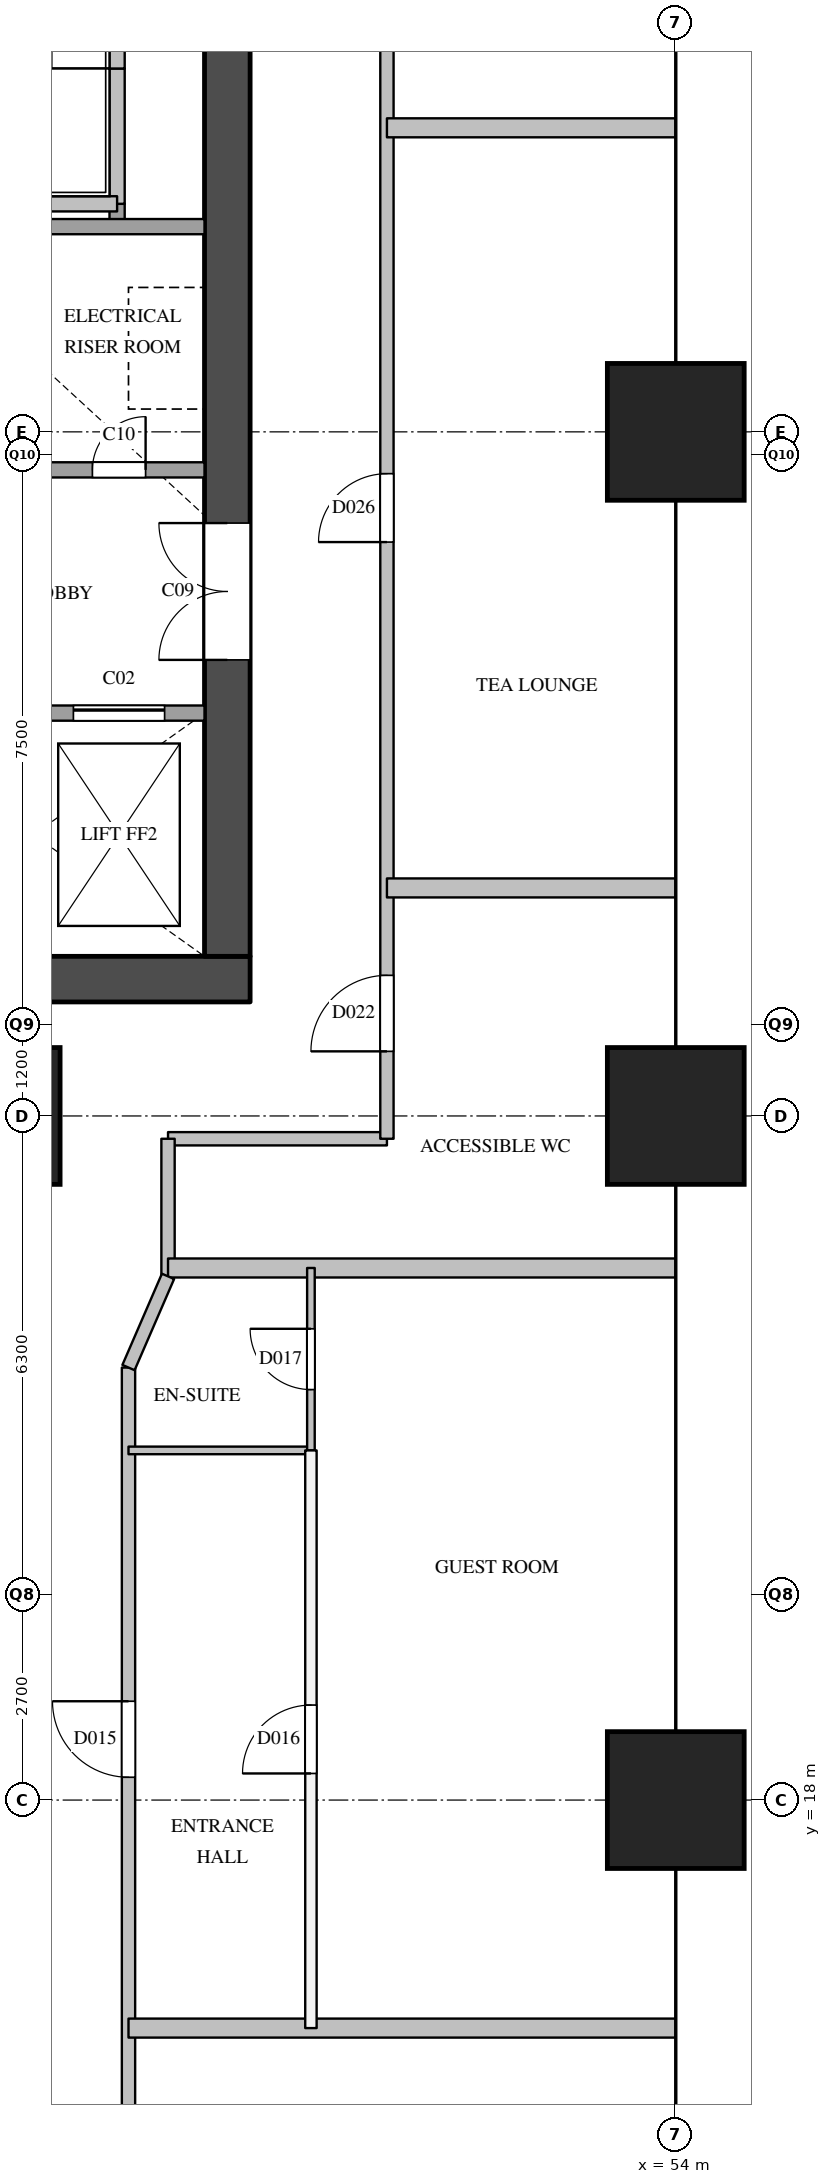
"""IFC4 building model, lengths in metres.
Left out: names, types, materials, properties, quantities, classifications, styles, units other than length and angle.
Written with IfcOpenShell. Run it as: python <this file> out.ifc"""

import sys

from ifc_helpers import new_model, si_unit, direction, frame, frame_2d, origin, origin_2d, place, context, subcontext, project, spatial, rectangle, extrude, element, fill, save


model = new_model("IFC4")
c1 = context("Model", 3, precision=1e-05, world=origin(), true_north=direction((0.0, 1.0)))
c2 = subcontext(c1, "Body", "Model", "MODEL_VIEW")
j1 = project(units=[si_unit("LENGTHUNIT", "METRE"), si_unit("PLANEANGLEUNIT", "RADIAN")], contexts=[c1])
p1 = place(None, origin())
s1 = spatial("IfcSite", under=j1, at=p1, CompositionType="ELEMENT")
p2 = place(p1, origin())
s2 = spatial("IfcBuilding", under=s1, at=p2, CompositionType="ELEMENT")
p3 = place(p2, frame((0.0, 0.0, 42.4)))
s3 = spatial("IfcBuildingStorey", under=s2, at=p3, CompositionType="ELEMENT", Elevation=42.4)
for number, where, z_axis, x_axis in (
    (1, (45.0, 27.0, 0.0), (0.0, 0.0, 1.0), (1.0, 0.0, 0.0)),
    (2, (54.0, 18.0, 0.0), (0.0, 0.0, 1.0), (1.0, 0.0, 0.0)),
    (3, (54.0, 27.0, 0.0), (0.0, 0.0, 1.0), (1.0, 0.0, 0.0)),
    (4, (54.0, 36.0, 0.0), (0.0, 0.0, 1.0), (1.0, 0.0, 0.0)),
):
    element("IfcColumn", number, at=place(p3, frame(where, z_axis=z_axis, x_axis=x_axis)), inside=s3, PredefinedType="COLUMN", context=c2, shape_type="SweptSolid", body=[
        extrude(rectangle(XDim=1.8, YDim=1.8, at=origin_2d()), origin(), (0.0, 0.0, 1.0), 3.8),
    ])
p4 = place(p3, frame((36.0, 28.8, 0.0), z_axis=(0.0, 0.0, 1.0), x_axis=(1.0, 0.0, 0.0)))
e5 = element("IfcWall", 5, at=p4, inside=s3, PredefinedType="SHEAR", context=c2, shape_type="SweptSolid", body=[
    extrude(rectangle(XDim=12.4, YDim=0.6, at=frame_2d((6.2, 0.0))), origin(), (0.0, 0.0, 1.0), 3.5),
])
p5 = place(p3, frame((48.1, 29.1, 0.0), z_axis=(0.0, 0.0, 1.0), x_axis=(0.0, 1.0, 0.0)))
e6 = element("IfcWall", 6, at=p5, inside=s3, PredefinedType="SHEAR", context=c2, shape_type="SweptSolid", body=[
    extrude(rectangle(XDim=20.3, YDim=0.6, at=frame_2d((10.15, 0.0))), origin(), (0.0, 0.0, 1.0), 3.5),
])
p6 = place(p5, frame((12.5, 0.0, 0.0)))
e7 = element("IfcOpeningElement", 7, at=p6, cuts=e6, PredefinedType="OPENING", context=c2, shape_type="SweptSolid", body=[
    extrude(rectangle(XDim=0.7, YDim=2.1, at=frame_2d((0.35, 1.05))), frame((0.0, 0.31, 0.0), z_axis=(0.0, -1.0, 0.0), x_axis=(1.0, 0.0, 0.0)), (0.0, 0.0, 1.0), 0.62),
])
p7 = place(p5, frame((3.9, 0.0, 0.0)))
e8 = element("IfcOpeningElement", 8, at=p7, cuts=e6, PredefinedType="OPENING", context=c2, shape_type="SweptSolid", body=[
    extrude(rectangle(XDim=1.8, YDim=2.1, at=frame_2d((0.9, 1.05))), frame((0.0, 0.31, 0.0), z_axis=(0.0, -1.0, 0.0), x_axis=(1.0, 0.0, 0.0)), (0.0, 0.0, 1.0), 0.62),
])
p8 = place(p3, frame((46.65, 38.7, 0.0), z_axis=(0.0, 0.0, 1.0), x_axis=(0.0, 1.0, 0.0)))
e9 = element("IfcWall", 9, at=p8, inside=s3, PredefinedType="SOLIDWALL", context=c2, shape_type="SweptSolid", body=[
    extrude(rectangle(XDim=0.3, YDim=0.2, at=frame_2d((0.15, 0.0))), origin(), (0.0, 0.0, 1.0), 3.5),
])
p9 = place(p3, frame((46.65, 39.0, 0.0), z_axis=(0.0, 0.0, 1.0), x_axis=(0.0, 1.0, 0.0)))
e10 = element("IfcWall", 10, at=p9, inside=s3, PredefinedType="SOLIDWALL", context=c2, shape_type="SweptSolid", body=[
    extrude(rectangle(XDim=1.78, YDim=0.2, at=frame_2d((0.89, 0.0))), origin(), (0.0, 0.0, 1.0), 3.5),
])
p10 = place(p3, frame((46.65, 40.78, 0.0), z_axis=(0.0, 0.0, 1.0), x_axis=(0.0, 1.0, 0.0)))
e11 = element("IfcWall", 11, at=p10, inside=s3, PredefinedType="SOLIDWALL", context=c2, shape_type="SweptSolid", body=[
    extrude(rectangle(XDim=4.42, YDim=0.2, at=frame_2d((2.21, 0.0))), origin(), (0.0, 0.0, 1.0), 3.5),
])
p11 = place(p3, frame((36.6, 32.3, 0.0), z_axis=(0.0, 0.0, 1.0), x_axis=(1.0, 0.0, 0.0)))
e12 = element("IfcWall", 12, at=p11, inside=s3, PredefinedType="SOLIDWALL", context=c2, shape_type="SweptSolid", body=[
    extrude(rectangle(XDim=11.2, YDim=0.2, at=frame_2d((5.6, 0.0))), origin(), (0.0, 0.0, 1.0), 3.5),
])
p12 = place(p11, frame((7.225, 0.0, 0.0)))
e13 = element("IfcOpeningElement", 13, at=p12, cuts=e12, PredefinedType="OPENING", context=c2, shape_type="SweptSolid", body=[
    extrude(rectangle(XDim=1.2, YDim=2.1, at=frame_2d((0.6, 1.05))), frame((0.0, 0.11, 0.0), z_axis=(0.0, -1.0, 0.0), x_axis=(1.0, 0.0, 0.0)), (0.0, 0.0, 1.0), 0.22),
])
p13 = place(p11, frame((9.475, 0.0, 0.0)))
e14 = element("IfcOpeningElement", 14, at=p13, cuts=e12, PredefinedType="OPENING", context=c2, shape_type="SweptSolid", body=[
    extrude(rectangle(XDim=1.2, YDim=2.1, at=frame_2d((0.6, 1.05))), frame((0.0, 0.11, 0.0), z_axis=(0.0, -1.0, 0.0), x_axis=(1.0, 0.0, 0.0)), (0.0, 0.0, 1.0), 0.22),
])
p14 = place(p3, frame((43.3, 35.5, 0.0), z_axis=(0.0, 0.0, 1.0), x_axis=(1.0, 0.0, 0.0)))
e15 = element("IfcWall", 15, at=p14, inside=s3, PredefinedType="SOLIDWALL", context=c2, shape_type="SweptSolid", body=[
    extrude(rectangle(XDim=4.5, YDim=0.2, at=frame_2d((2.25, 0.0))), origin(), (0.0, 0.0, 1.0), 3.5),
])
p15 = place(p14, frame((0.525, 0.0, 0.0)))
e16 = element("IfcOpeningElement", 16, at=p15, cuts=e15, PredefinedType="OPENING", context=c2, shape_type="SweptSolid", body=[
    extrude(rectangle(XDim=1.2, YDim=2.1, at=frame_2d((0.6, 1.05))), frame((0.0, 0.11, 0.0), z_axis=(0.0, -1.0, 0.0), x_axis=(1.0, 0.0, 0.0)), (0.0, 0.0, 1.0), 0.22),
])
p16 = place(p14, frame((3.025, 0.0, 0.0)))
e17 = element("IfcOpeningElement", 17, at=p16, cuts=e15, PredefinedType="OPENING", context=c2, shape_type="SweptSolid", body=[
    extrude(rectangle(XDim=0.7, YDim=2.1, at=frame_2d((0.35, 1.05))), frame((0.0, 0.11, 0.0), z_axis=(0.0, -1.0, 0.0), x_axis=(1.0, 0.0, 0.0)), (0.0, 0.0, 1.0), 0.22),
])
p17 = place(p3, frame((43.3, 38.7, 0.0), z_axis=(0.0, 0.0, 1.0), x_axis=(1.0, 0.0, 0.0)))
e18 = element("IfcWall", 18, at=p17, inside=s3, PredefinedType="SOLIDWALL", context=c2, shape_type="SweptSolid", body=[
    extrude(rectangle(XDim=4.5, YDim=0.2, at=frame_2d((2.25, 0.0))), origin(), (0.0, 0.0, 1.0), 3.5),
])
p18 = place(p3, frame((43.4, 39.0, 0.0), z_axis=(0.0, 0.0, 1.0), x_axis=(1.0, 0.0, 0.0)))
e19 = element("IfcWall", 19, at=p18, inside=s3, PredefinedType="SOLIDWALL", context=c2, shape_type="SweptSolid", body=[
    extrude(rectangle(XDim=3.25, YDim=0.2, at=frame_2d((1.625, 0.0))), origin(), (0.0, 0.0, 1.0), 3.5),
])
p19 = place(p3, frame((47.32, 26.7, 0.0), z_axis=(0.0, 0.0, 1.0), x_axis=(1.0, 0.0, 0.0)))
e20 = element("IfcWall", 20, at=p19, inside=s3, PredefinedType="PARTITIONING", context=c2, shape_type="SweptSolid", body=[
    extrude(rectangle(XDim=2.88, YDim=0.175, at=frame_2d((1.44, 0.0))), origin(), (0.0, 0.0, 1.0), 2.5),
])
p20 = place(p3, frame((46.8, 7.2, 0.0), z_axis=(0.0, 0.0, 1.0), x_axis=(0.0, 1.0, 0.0)))
e21 = element("IfcWall", 21, at=p20, inside=s3, PredefinedType="PARTITIONING", context=c2, shape_type="SweptSolid", body=[
    extrude(rectangle(XDim=16.49, YDim=0.175, at=frame_2d((8.245, 0.0))), origin(), (0.0, 0.0, 1.0), 3.5),
])
p21 = place(p20, frame((3.45, 0.0, 0.0)))
e22 = element("IfcOpeningElement", 22, at=p21, cuts=e21, PredefinedType="OPENING", context=c2, shape_type="SweptSolid", body=[
    extrude(rectangle(XDim=0.9, YDim=2.1, at=frame_2d((0.45, 1.05))), frame((0.0, 0.097, 0.0), z_axis=(0.0, -1.0, 0.0), x_axis=(1.0, 0.0, 0.0)), (0.0, 0.0, 1.0), 0.195),
])
p22 = place(p20, frame((11.1, 0.0, 0.0)))
e23 = element("IfcOpeningElement", 23, at=p22, cuts=e21, PredefinedType="OPENING", context=c2, shape_type="SweptSolid", body=[
    extrude(rectangle(XDim=1.0, YDim=2.1, at=frame_2d((0.5, 1.05))), frame((0.0, 0.097, 0.0), z_axis=(0.0, -1.0, 0.0), x_axis=(1.0, 0.0, 0.0)), (0.0, 0.0, 1.0), 0.195),
])
p23 = place(p3, frame((47.32, 24.89, 0.0), z_axis=(0.0, 0.0, 1.0), x_axis=(0.0, 1.0, 0.0)))
e24 = element("IfcWall", 24, at=p23, inside=s3, PredefinedType="PARTITIONING", context=c2, shape_type="SweptSolid", body=[
    extrude(rectangle(XDim=1.81, YDim=0.175, at=frame_2d((0.905, 0.0))), origin(), (0.0, 0.0, 1.0), 2.5),
])
p24 = place(p3, frame((50.2, 26.7, 0.0), z_axis=(0.0, 0.0, 1.0), x_axis=(0.0, 1.0, 0.0)))
e25 = element("IfcWall", 25, at=p24, inside=s3, PredefinedType="PARTITIONING", context=c2, shape_type="SweptSolid", body=[
    extrude(rectangle(XDim=25.1, YDim=0.175, at=frame_2d((12.55, 0.0))), origin(), (0.0, 0.0, 1.0), 2.5),
])
p25 = place(p24, frame((1.15, 0.0, 0.0)))
e26 = element("IfcOpeningElement", 26, at=p25, cuts=e25, PredefinedType="OPENING", context=c2, shape_type="SweptSolid", body=[
    extrude(rectangle(XDim=1.0, YDim=2.1, at=frame_2d((0.5, 1.05))), frame((0.0, 0.097, 0.0), z_axis=(0.0, -1.0, 0.0), x_axis=(1.0, 0.0, 0.0)), (0.0, 0.0, 1.0), 0.195),
])
p26 = place(p24, frame((7.85, 0.0, 0.0)))
e27 = element("IfcOpeningElement", 27, at=p26, cuts=e25, PredefinedType="OPENING", context=c2, shape_type="SweptSolid", body=[
    extrude(rectangle(XDim=0.9, YDim=2.1, at=frame_2d((0.45, 1.05))), frame((0.0, 0.097, 0.0), z_axis=(0.0, -1.0, 0.0), x_axis=(1.0, 0.0, 0.0)), (0.0, 0.0, 1.0), 0.195),
])
p27 = place(p24, frame((15.35, 0.0, 0.0)))
e28 = element("IfcOpeningElement", 28, at=p27, cuts=e25, PredefinedType="OPENING", context=c2, shape_type="SweptSolid", body=[
    extrude(rectangle(XDim=0.9, YDim=2.1, at=frame_2d((0.45, 1.05))), frame((0.0, 0.097, 0.0), z_axis=(0.0, -1.0, 0.0), x_axis=(1.0, 0.0, 0.0)), (0.0, 0.0, 1.0), 0.195),
])
p28 = place(p24, frame((21.25, 0.0, 0.0)))
e29 = element("IfcOpeningElement", 29, at=p28, cuts=e25, PredefinedType="OPENING", context=c2, shape_type="SweptSolid", body=[
    extrude(rectangle(XDim=0.9, YDim=2.1, at=frame_2d((0.45, 1.05))), frame((0.0, 0.097, 0.0), z_axis=(0.0, -1.0, 0.0), x_axis=(1.0, 0.0, 0.0)), (0.0, 0.0, 1.0), 0.195),
])
p29 = place(p3, frame((49.2, 15.0, 0.0), z_axis=(0.0, 0.0, 1.0), x_axis=(0.0, 1.0, 0.0)))
e30 = element("IfcWall", 30, at=p29, inside=s3, PredefinedType="PARTITIONING", context=c2, shape_type="SweptSolid", body=[
    extrude(rectangle(XDim=7.6, YDim=0.15, at=frame_2d((3.8, 0.0))), origin(), (0.0, 0.0, 1.0), 3.5),
])
p30 = place(p29, frame((3.35, 0.0, 0.0)))
e31 = element("IfcOpeningElement", 31, at=p30, cuts=e30, PredefinedType="OPENING", context=c2, shape_type="SweptSolid", body=[
    extrude(rectangle(XDim=0.9, YDim=2.1, at=frame_2d((0.45, 1.05))), frame((0.0, 0.085, 0.0), z_axis=(0.0, -1.0, 0.0), x_axis=(1.0, 0.0, 0.0)), (0.0, 0.0, 1.0), 0.17),
])
p31 = place(p3, frame((46.8, 15.0, 0.0), z_axis=(0.0, 0.0, 1.0), x_axis=(1.0, 0.0, 0.0)))
e32 = element("IfcWall", 32, at=p31, inside=s3, PredefinedType="PARTITIONING", context=c2, shape_type="SweptSolid", body=[
    extrude(rectangle(XDim=7.2, YDim=0.25, at=frame_2d((3.6, 0.0))), origin(), (0.0, 0.0, 1.0), 2.5),
])
p32 = place(p3, frame((47.32, 25.0, 0.0), z_axis=(0.0, 0.0, 1.0), x_axis=(1.0, 0.0, 0.0)))
e33 = element("IfcWall", 33, at=p32, inside=s3, PredefinedType="PARTITIONING", context=c2, shape_type="SweptSolid", body=[
    extrude(rectangle(XDim=6.68, YDim=0.25, at=frame_2d((3.34, 0.0))), origin(), (0.0, 0.0, 1.0), 2.5),
])
for number, where, z_axis, x_axis in (
    (34, (50.2, 30.0, 0.0), (0.0, 0.0, 1.0), (1.0, 0.0, 0.0)),
    (35, (50.2, 40.0, 0.0), (0.0, 0.0, 1.0), (1.0, 0.0, 0.0)),
):
    element("IfcWall", number, at=place(p3, frame(where, z_axis=z_axis, x_axis=x_axis)), inside=s3, PredefinedType="PARTITIONING", context=c2, shape_type="SweptSolid", body=[
        extrude(rectangle(XDim=3.8, YDim=0.25, at=frame_2d((1.9, 0.0))), origin(), (0.0, 0.0, 1.0), 2.5),
    ])
p33 = place(p3, frame((46.8, 22.6, 0.0), z_axis=(0.0, 0.0, 1.0), x_axis=(1.0, 0.0, 0.0)))
e36 = element("IfcWall", 36, at=p33, inside=s3, PredefinedType="PARTITIONING", context=c2, shape_type="SweptSolid", body=[
    extrude(rectangle(XDim=2.4, YDim=0.1, at=frame_2d((1.2, 0.0))), origin(), (0.0, 0.0, 1.0), 3.5),
])
p34 = place(p3, frame((49.2, 22.6, 0.0), z_axis=(0.0, 0.0, 1.0), x_axis=(0.0, 1.0, 0.0)))
e37 = element("IfcWall", 37, at=p34, inside=s3, PredefinedType="PARTITIONING", context=c2, shape_type="SweptSolid", body=[
    extrude(rectangle(XDim=2.4, YDim=0.1, at=frame_2d((1.2, 0.0))), origin(), (0.0, 0.0, 1.0), 3.5),
])
p35 = place(p34, frame((0.8, 0.0, 0.0)))
e38 = element("IfcOpeningElement", 38, at=p35, cuts=e37, PredefinedType="OPENING", context=c2, shape_type="SweptSolid", body=[
    extrude(rectangle(XDim=0.8, YDim=2.1, at=frame_2d((0.4, 1.05))), frame((0.0, 0.06, 0.0), z_axis=(0.0, -1.0, 0.0), x_axis=(1.0, 0.0, 0.0)), (0.0, 0.0, 1.0), 0.12),
])
p36 = place(p3, frame((47.32, 24.89, 0.0), z_axis=(0.0, 0.0, 1.0), x_axis=(-0.397633632391, -0.917544273804, 0.0)))
e39 = element("IfcWall", 39, at=p36, inside=s3, PredefinedType="PARTITIONING", context=c2, shape_type="SweptSolid", body=[
    extrude(rectangle(XDim=1.308, YDim=0.175, at=frame_2d((0.654, 0.0))), origin(), (0.0, 0.0, 1.0), 3.5),
])
p37 = place(p13, origin())
e40 = element("IfcDoor", 40, at=p37, inside=s3, OperationType="SLIDING_TO_LEFT", PredefinedType="DOOR", context=c2, shape_type="SweptSolid", body=[
    extrude(rectangle(XDim=1.2, YDim=2.1, at=frame_2d((0.6, 1.05))), frame((0.0, 0.025, 0.0), z_axis=(0.0, -1.0, 0.0), x_axis=(1.0, 0.0, 0.0)), (0.0, 0.0, 1.0), 0.05),
])
fill(e14, e40)
p38 = place(p7, origin())
e41 = element("IfcDoor", 41, at=p38, inside=s3, OperationType="DOUBLE_DOOR_SINGLE_SWING", PredefinedType="DOOR", context=c2, shape_type="SweptSolid", body=[
    extrude(rectangle(XDim=1.8, YDim=2.1, at=frame_2d((0.9, 1.05))), frame((0.0, 0.025, 0.0), z_axis=(0.0, -1.0, 0.0), x_axis=(1.0, 0.0, 0.0)), (0.0, 0.0, 1.0), 0.05),
])
fill(e8, e41)
p39 = place(p16, origin())
e42 = element("IfcDoor", 42, at=p39, inside=s3, OperationType="SINGLE_SWING_RIGHT", PredefinedType="DOOR", context=c2, shape_type="SweptSolid", body=[
    extrude(rectangle(XDim=0.7, YDim=2.1, at=frame_2d((0.35, 1.05))), frame((0.0, 0.025, 0.0), z_axis=(0.0, -1.0, 0.0), x_axis=(1.0, 0.0, 0.0)), (0.0, 0.0, 1.0), 0.05),
])
fill(e17, e42)
p40 = place(p22, origin())
e43 = element("IfcDoor", 43, at=p40, inside=s3, OperationType="SINGLE_SWING_RIGHT", PredefinedType="DOOR", context=c2, shape_type="SweptSolid", body=[
    extrude(rectangle(XDim=1.0, YDim=2.1, at=frame_2d((0.5, 1.05))), frame((0.0, 0.025, 0.0), z_axis=(0.0, -1.0, 0.0), x_axis=(1.0, 0.0, 0.0)), (0.0, 0.0, 1.0), 0.05),
])
fill(e23, e43)
p41 = place(p30, origin())
e44 = element("IfcDoor", 44, at=p41, inside=s3, OperationType="SINGLE_SWING_LEFT", PredefinedType="DOOR", context=c2, shape_type="SweptSolid", body=[
    extrude(rectangle(XDim=0.9, YDim=2.1, at=frame_2d((0.45, 1.05))), frame((0.0, 0.025, 0.0), z_axis=(0.0, -1.0, 0.0), x_axis=(1.0, 0.0, 0.0)), (0.0, 0.0, 1.0), 0.05),
])
fill(e31, e44)
p42 = place(p35, origin())
e45 = element("IfcDoor", 45, at=p42, inside=s3, OperationType="SINGLE_SWING_RIGHT", PredefinedType="DOOR", context=c2, shape_type="SweptSolid", body=[
    extrude(rectangle(XDim=0.8, YDim=2.1, at=frame_2d((0.4, 1.05))), frame((0.0, 0.025, 0.0), z_axis=(0.0, -1.0, 0.0), x_axis=(1.0, 0.0, 0.0)), (0.0, 0.0, 1.0), 0.05),
])
fill(e38, e45)
p43 = place(p25, origin())
e46 = element("IfcDoor", 46, at=p43, inside=s3, OperationType="SINGLE_SWING_LEFT", PredefinedType="DOOR", context=c2, shape_type="SweptSolid", body=[
    extrude(rectangle(XDim=1.0, YDim=2.1, at=frame_2d((0.5, 1.05))), frame((0.0, 0.025, 0.0), z_axis=(0.0, -1.0, 0.0), x_axis=(1.0, 0.0, 0.0)), (0.0, 0.0, 1.0), 0.05),
])
fill(e26, e46)
p44 = place(p26, origin())
e47 = element("IfcDoor", 47, at=p44, inside=s3, OperationType="SINGLE_SWING_LEFT", PredefinedType="DOOR", context=c2, shape_type="SweptSolid", body=[
    extrude(rectangle(XDim=0.9, YDim=2.1, at=frame_2d((0.45, 1.05))), frame((0.0, 0.025, 0.0), z_axis=(0.0, -1.0, 0.0), x_axis=(1.0, 0.0, 0.0)), (0.0, 0.0, 1.0), 0.05),
])
fill(e27, e47)
save(model, sys.argv[1])
